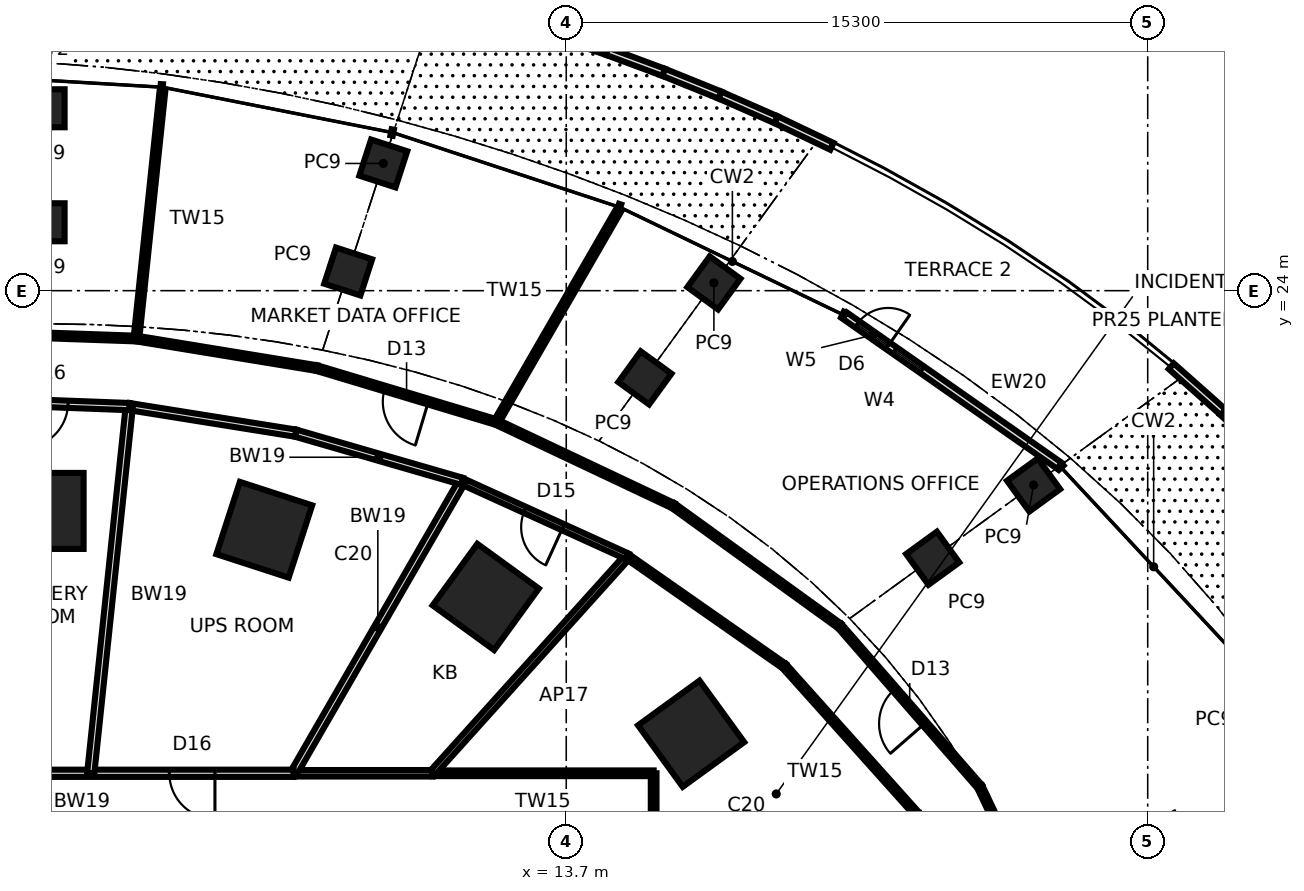
"""IFC4 building model, lengths in metres.
Left out: names, types, materials, properties, quantities, classifications, styles, units other than length and angle.
Written with IfcOpenShell. Run it as: python <this file> out.ifc"""

import sys

from ifc_helpers import new_model, si_unit, direction, frame, frame_2d, origin, origin_2d, place, context, subcontext, project, spatial, rectangle, extrude, element, fill, save


model = new_model("IFC4")
c1 = context("Model", 3, precision=1e-05, world=origin(), true_north=direction((0.0, 1.0)))
c2 = subcontext(c1, "Body", "Model", "MODEL_VIEW")
j1 = project(units=[si_unit("LENGTHUNIT", "METRE"), si_unit("PLANEANGLEUNIT", "RADIAN")], contexts=[c1])
p1 = place(None, origin())
s1 = spatial("IfcSite", under=j1, at=p1, CompositionType="ELEMENT")
p2 = place(p1, origin())
s2 = spatial("IfcBuilding", under=s1, at=p2, CompositionType="ELEMENT")
p3 = place(p2, frame((0.0, 0.0, 10.6)))
s3 = spatial("IfcBuildingStorey", under=s2, at=p3, CompositionType="ELEMENT", Elevation=10.6)
for number, where, z_axis, x_axis in (
    (1, (16.986, 12.341, 0.0), (0.0, 0.0, 1.0), (0.809, 0.588, 0.0)),
    (2, (11.581, 15.94, 0.0), (0.0, 0.0, 1.0), (0.588, 0.809, 0.0)),
    (3, (5.754, 17.708, 0.0), (0.0, 0.0, 1.0), (0.309, 0.951, 0.0)),
    (4, (0.0, 18.204, 0.0), (0.0, 0.0, 1.0), (0.0, 1.0, 0.0)),
):
    element("IfcColumn", number, at=place(p3, frame(where, z_axis=z_axis, x_axis=x_axis)), inside=s3, PredefinedType="COLUMN", context=c2, shape_type="SweptSolid", body=[
        extrude(rectangle(XDim=2.0, YDim=2.0, at=origin_2d()), origin(), (0.0, 0.0, 1.0), 4.5),
    ])
for number, where, z_axis, x_axis in (
    (5, (25.997, 18.888, 0.0), (0.0, 0.0, 1.0), (0.809, 0.588, 0.0)),
    (6, (17.585, 24.204, 0.0), (0.0, 0.0, 1.0), (0.588, 0.809, 0.0)),
    (7, (8.886, 27.347, 0.0), (0.0, 0.0, 1.0), (0.309, 0.951, 0.0)),
    (8, (0.0, 28.8, 0.0), (0.0, 0.0, 1.0), (0.0, 1.0, 0.0)),
    (9, (23.342, 16.959, 0.0), (0.0, 0.0, 1.0), (0.809, 0.588, 0.0)),
    (10, (15.77, 21.705, 0.0), (0.0, 0.0, 1.0), (0.588, 0.809, 0.0)),
    (11, (7.962, 24.504, 0.0), (0.0, 0.0, 1.0), (0.309, 0.951, 0.0)),
    (12, (0.0, 25.8, 0.0), (0.0, 0.0, 1.0), (0.0, 1.0, 0.0)),
):
    element("IfcColumn", number, at=place(p3, frame(where, z_axis=z_axis, x_axis=x_axis)), inside=s3, PredefinedType="COLUMN", context=c2, shape_type="SweptSolid", body=[
        extrude(rectangle(XDim=1.0, YDim=1.0, at=origin_2d()), origin(), (0.0, 0.0, 1.0), 4.5),
    ])
p4 = place(p3, frame((26.684, 19.387, 0.0), z_axis=(0.0, 0.0, 1.0), x_axis=(-0.81941448175, 0.573201454202, 0.0)))
e13 = element("IfcWall", 13, at=p4, inside=s3, PredefinedType="SOLIDWALL", context=c2, shape_type="SweptSolid", body=[
    extrude(rectangle(XDim=6.909, YDim=0.2, at=frame_2d((3.455, 0.0))), origin(), (0.0, 0.0, 1.0), 4.3),
])
p5 = place(p4, frame((5.51, 0.0, 0.0)))
e14 = element("IfcOpeningElement", 14, at=p5, cuts=e13, PredefinedType="OPENING", context=c2, shape_type="SweptSolid", body=[
    extrude(rectangle(XDim=1.0, YDim=2.4, at=frame_2d((0.5, 1.2))), frame((0.0, 0.11, 0.0), z_axis=(0.0, -1.0, 0.0), x_axis=(1.0, 0.0, 0.0)), (0.0, 0.0, 1.0), 0.22),
])
p6 = place(p4, frame((4.409, 0.0, 0.3)))
e15 = element("IfcOpeningElement", 15, at=p6, cuts=e13, PredefinedType="OPENING", context=c2, shape_type="SweptSolid", body=[
    extrude(rectangle(XDim=0.9, YDim=2.1, at=frame_2d((0.45, 1.05))), frame((0.0, 0.11, 0.0), z_axis=(0.0, -1.0, 0.0), x_axis=(1.0, 0.0, 0.0)), (0.0, 0.0, 1.0), 0.22),
])
p7 = place(p4, frame((5.51, 0.0, 2.7)))
e16 = element("IfcOpeningElement", 16, at=p7, cuts=e13, PredefinedType="OPENING", context=c2, shape_type="SweptSolid", body=[
    extrude(rectangle(XDim=1.0, YDim=0.6, at=frame_2d((0.5, 0.3))), frame((0.0, 0.11, 0.0), z_axis=(0.0, -1.0, 0.0), x_axis=(1.0, 0.0, 0.0)), (0.0, 0.0, 1.0), 0.22),
])
p8 = place(p3, frame((32.301, 19.511, 0.0), z_axis=(0.0, 0.0, 1.0), x_axis=(-0.714091012731, 0.700052873386, 0.0)))
e17 = element("IfcWall", 17, at=p8, inside=s3, PredefinedType="PARAPET", context=c2, shape_type="SweptSolid", body=[
    extrude(rectangle(XDim=1.844, YDim=0.2, at=frame_2d((0.922, 0.0))), origin(), (0.0, 0.0, 1.0), 1.1),
])
p9 = place(p3, frame((30.985, 20.802, 0.0), z_axis=(0.0, 0.0, 1.0), x_axis=(-0.748198942799, 0.66347444713, 0.0)))
e18 = element("IfcWall", 18, at=p9, inside=s3, PredefinedType="PARAPET", context=c2, shape_type="SweptSolid", body=[
    extrude(rectangle(XDim=1.824, YDim=0.2, at=frame_2d((0.912, 0.0))), origin(), (0.0, 0.0, 1.0), 1.1),
])
p10 = place(p3, frame((20.69, 27.798, 0.0), z_axis=(0.0, 0.0, 1.0), x_axis=(-0.902860518824, 0.429933580392, 0.0)))
e19 = element("IfcWall", 19, at=p10, inside=s3, PredefinedType="PARAPET", context=c2, shape_type="SweptSolid", body=[
    extrude(rectangle(XDim=1.63, YDim=0.2, at=frame_2d((0.815, 0.0))), origin(), (0.0, 0.0, 1.0), 1.1),
])
p11 = place(p3, frame((19.219, 28.499, 0.0), z_axis=(0.0, 0.0, 1.0), x_axis=(-0.915569278609, 0.402160286537, 0.0)))
e20 = element("IfcWall", 20, at=p11, inside=s3, PredefinedType="PARAPET", context=c2, shape_type="SweptSolid", body=[
    extrude(rectangle(XDim=1.613, YDim=0.2, at=frame_2d((0.807, 0.0))), origin(), (0.0, 0.0, 1.0), 1.1),
])
p12 = place(p3, frame((17.742, 29.148, 0.0), z_axis=(0.0, 0.0, 1.0), x_axis=(-0.9270897295, 0.374839476918, 0.0)))
e21 = element("IfcWall", 21, at=p12, inside=s3, PredefinedType="PARAPET", context=c2, shape_type="SweptSolid", body=[
    extrude(rectangle(XDim=1.598, YDim=0.2, at=frame_2d((0.799, 0.0))), origin(), (0.0, 0.0, 1.0), 1.1),
])
p13 = place(p3, frame((16.261, 29.747, 0.0), z_axis=(0.0, 0.0, 1.0), x_axis=(-0.93734477398, 0.348403178361, 0.0)))
e22 = element("IfcWall", 22, at=p13, inside=s3, PredefinedType="PARAPET", context=c2, shape_type="SweptSolid", body=[
    extrude(rectangle(XDim=1.584, YDim=0.2, at=frame_2d((0.792, 0.0))), origin(), (0.0, 0.0, 1.0), 1.1),
])
p14 = place(p3, frame((14.776, 30.299, 0.0), z_axis=(0.0, 0.0, 1.0), x_axis=(-0.946756658341, 0.321950042532, 0.0)))
e23 = element("IfcWall", 23, at=p14, inside=s3, PredefinedType="PARAPET", context=c2, shape_type="SweptSolid", body=[
    extrude(rectangle(XDim=1.573, YDim=0.2, at=frame_2d((0.786, 0.0))), origin(), (0.0, 0.0, 1.0), 1.1),
])
p15 = place(p3, frame((26.666, 6.552, 0.0), z_axis=(0.0, 0.0, 1.0), x_axis=(-0.428597870995, 0.903495359688, 0.0)))
e24 = element("IfcWall", 24, at=p15, inside=s3, PredefinedType="PARTITIONING", context=c2, shape_type="SweptSolid", body=[
    extrude(rectangle(XDim=4.862, YDim=0.15, at=frame_2d((2.431, 0.0))), origin(), (0.0, 0.0, 1.0), 4.3),
])
p16 = place(p3, frame((16.0, 4.321, 0.0), z_axis=(0.0, 0.0, 1.0), x_axis=(0.0, 1.0, 0.0)))
e25 = element("IfcWall", 25, at=p16, inside=s3, PredefinedType="PARTITIONING", context=c2, shape_type="SweptSolid", body=[
    extrude(rectangle(XDim=6.979, YDim=0.15, at=frame_2d((3.49, 0.0))), origin(), (0.0, 0.0, 1.0), 4.3),
])
p17 = place(p16, frame((2.915, 0.0, 0.0)))
e26 = element("IfcOpeningElement", 26, at=p17, cuts=e25, PredefinedType="OPENING", context=c2, shape_type="SweptSolid", body=[
    extrude(rectangle(XDim=1.2, YDim=2.4, at=frame_2d((0.6, 1.2))), frame((0.0, 0.085, 0.0), z_axis=(0.0, -1.0, 0.0), x_axis=(1.0, 0.0, 0.0)), (0.0, 0.0, 1.0), 0.17),
])
p18 = place(p3, frame((19.436, 14.121, 0.0), z_axis=(0.0, 0.0, 1.0), x_axis=(0.667266603128, -0.744818958103, 0.0)))
e27 = element("IfcWall", 27, at=p18, inside=s3, PredefinedType="PARTITIONING", context=c2, shape_type="SweptSolid", body=[
    extrude(rectangle(XDim=5.248, YDim=0.15, at=frame_2d((2.624, 0.0))), origin(), (0.0, 0.0, 1.0), 4.3),
])
p19 = place(p3, frame((24.582, 10.945, 0.0), z_axis=(0.0, 0.0, 1.0), x_axis=(-0.656952161656, 0.753932263069, 0.0)))
e28 = element("IfcWall", 28, at=p19, inside=s3, PredefinedType="PARTITIONING", context=c2, shape_type="SweptSolid", body=[
    extrude(rectangle(XDim=5.616, YDim=0.15, at=frame_2d((2.808, 0.0))), origin(), (0.0, 0.0, 1.0), 4.3),
])
p20 = place(p19, frame((2.208, 0.0, 0.0)))
e29 = element("IfcOpeningElement", 29, at=p20, cuts=e28, PredefinedType="OPENING", context=c2, shape_type="SweptSolid", body=[
    extrude(rectangle(XDim=1.2, YDim=2.4, at=frame_2d((0.6, 1.2))), frame((0.0, 0.085, 0.0), z_axis=(0.0, -1.0, 0.0), x_axis=(1.0, 0.0, 0.0)), (0.0, 0.0, 1.0), 0.17),
])
p21 = place(p3, frame((16.0, 11.3, 0.0), z_axis=(0.0, 0.0, 1.0), x_axis=(-1.0, 0.0, 0.0)))
e30 = element("IfcWall", 30, at=p21, inside=s3, PredefinedType="PARTITIONING", context=c2, shape_type="SweptSolid", body=[
    extrude(rectangle(XDim=5.825, YDim=0.15, at=frame_2d((2.913, 0.0))), origin(), (0.0, 0.0, 1.0), 4.3),
])
p22 = place(p3, frame((15.311, 17.004, 0.0), z_axis=(0.0, 0.0, 1.0), x_axis=(0.819662413359, -0.572846862719, 0.0)))
e31 = element("IfcWall", 31, at=p22, inside=s3, PredefinedType="PARTITIONING", context=c2, shape_type="SweptSolid", body=[
    extrude(rectangle(XDim=5.033, YDim=0.15, at=frame_2d((2.517, 0.0))), origin(), (0.0, 0.0, 1.0), 4.3),
])
p23 = place(p3, frame((20.892, 15.179, 0.0), z_axis=(0.0, 0.0, 1.0), x_axis=(-0.810528990045, 0.585698519971, 0.0)))
e32 = element("IfcWall", 32, at=p23, inside=s3, PredefinedType="PARTITIONING", context=c2, shape_type="SweptSolid", body=[
    extrude(rectangle(XDim=5.4, YDim=0.15, at=frame_2d((2.7, 0.0))), origin(), (0.0, 0.0, 1.0), 4.3),
])
p24 = place(p3, frame((10.175, 11.3, 0.0), z_axis=(0.0, 0.0, 1.0), x_axis=(0.669129902119, 0.743145459577, 0.0)))
e33 = element("IfcWall", 33, at=p24, inside=s3, PredefinedType="PARTITIONING", context=c2, shape_type="SweptSolid", body=[
    extrude(rectangle(XDim=7.676, YDim=0.17, at=frame_2d((3.838, 0.0))), origin(), (0.0, 0.0, 1.0), 4.3),
])
p25 = place(p3, frame((10.175, 11.3, 0.0), z_axis=(0.0, 0.0, 1.0), x_axis=(-1.0, 0.0, 0.0)))
e34 = element("IfcWall", 34, at=p25, inside=s3, PredefinedType="PARTITIONING", context=c2, shape_type="SweptSolid", body=[
    extrude(rectangle(XDim=3.65, YDim=0.17, at=frame_2d((1.825, 0.0))), origin(), (0.0, 0.0, 1.0), 4.3),
])
p26 = place(p3, frame((10.96, 18.983, 0.0), z_axis=(0.0, 0.0, 1.0), x_axis=(0.91025098655, -0.414056930246, 0.0)))
e35 = element("IfcWall", 35, at=p26, inside=s3, PredefinedType="PARTITIONING", context=c2, shape_type="SweptSolid", body=[
    extrude(rectangle(XDim=4.78, YDim=0.17, at=frame_2d((2.39, 0.0))), origin(), (0.0, 0.0, 1.0), 4.3),
])
p27 = place(p26, frame((1.815, 0.0, 0.0)))
e36 = element("IfcOpeningElement", 36, at=p27, cuts=e35, PredefinedType="OPENING", context=c2, shape_type="SweptSolid", body=[
    extrude(rectangle(XDim=1.1, YDim=2.4, at=frame_2d((0.55, 1.2))), frame((0.0, 0.095, 0.0), z_axis=(0.0, -1.0, 0.0), x_axis=(1.0, 0.0, 0.0)), (0.0, 0.0, 1.0), 0.19),
])
p28 = place(p3, frame((16.515, 18.342, 0.0), z_axis=(0.0, 0.0, 1.0), x_axis=(-0.904108237681, 0.427303515732, 0.0)))
e37 = element("IfcWall", 37, at=p28, inside=s3, PredefinedType="PARTITIONING", context=c2, shape_type="SweptSolid", body=[
    extrude(rectangle(XDim=5.149, YDim=0.15, at=frame_2d((2.574, 0.0))), origin(), (0.0, 0.0, 1.0), 4.3),
])
p29 = place(p3, frame((6.524, 11.3, 0.0), z_axis=(0.0, 0.0, 1.0), x_axis=(0.499995604398, 0.866027941571, 0.0)))
e38 = element("IfcWall", 38, at=p29, inside=s3, PredefinedType="SOLIDWALL", context=c2, shape_type="SweptSolid", body=[
    extrude(rectangle(XDim=8.872, YDim=0.19, at=frame_2d((4.436, 0.0))), origin(), (0.0, 0.0, 1.0), 4.3),
])
p30 = place(p3, frame((11.86, 20.542, 0.0), z_axis=(0.0, 0.0, 1.0), x_axis=(0.500015529916, 0.866016437397, 0.0)))
e39 = element("IfcWall", 39, at=p30, inside=s3, PredefinedType="PARTITIONING", context=c2, shape_type="SweptSolid", body=[
    extrude(rectangle(XDim=6.442, YDim=0.15, at=frame_2d((3.221, 0.0))), origin(), (0.0, 0.0, 1.0), 4.3),
])
p31 = place(p3, frame((6.58, 20.25, 0.0), z_axis=(0.0, 0.0, 1.0), x_axis=(0.960617684211, -0.277873469014, 0.0)))
e40 = element("IfcWall", 40, at=p31, inside=s3, PredefinedType="SOLIDWALL", context=c2, shape_type="SweptSolid", body=[
    extrude(rectangle(XDim=4.56, YDim=0.19, at=frame_2d((2.28, 0.0))), origin(), (0.0, 0.0, 1.0), 4.3),
])
p32 = place(p3, frame((11.86, 20.542, 0.0), z_axis=(0.0, 0.0, 1.0), x_axis=(-0.957658569451, 0.287906346504, 0.0)))
e41 = element("IfcWall", 41, at=p32, inside=s3, PredefinedType="PARTITIONING", context=c2, shape_type="SweptSolid", body=[
    extrude(rectangle(XDim=4.933, YDim=0.15, at=frame_2d((2.466, 0.0))), origin(), (0.0, 0.0, 1.0), 4.3),
])
p33 = place(p32, frame((1.866, 0.0, 0.0)))
e42 = element("IfcOpeningElement", 42, at=p33, cuts=e41, PredefinedType="OPENING", context=c2, shape_type="SweptSolid", body=[
    extrude(rectangle(XDim=1.2, YDim=2.4, at=frame_2d((0.6, 1.2))), frame((0.0, 0.085, 0.0), z_axis=(0.0, -1.0, 0.0), x_axis=(1.0, 0.0, 0.0)), (0.0, 0.0, 1.0), 0.17),
])
p34 = place(p3, frame((6.524, 11.3, 0.0), z_axis=(0.0, 0.0, 1.0), x_axis=(-1.0, 0.0, 0.0)))
e43 = element("IfcWall", 43, at=p34, inside=s3, PredefinedType="SOLIDWALL", context=c2, shape_type="SweptSolid", body=[
    extrude(rectangle(XDim=7.712, YDim=0.19, at=frame_2d((3.856, 0.0))), origin(), (0.0, 0.0, 1.0), 4.3),
])
p35 = place(p34, frame((2.068, 0.0, 0.0)))
e44 = element("IfcOpeningElement", 44, at=p35, cuts=e43, PredefinedType="OPENING", context=c2, shape_type="SweptSolid", body=[
    extrude(rectangle(XDim=1.2, YDim=2.1, at=frame_2d((0.6, 1.05))), frame((0.0, 0.105, 0.0), z_axis=(0.0, -1.0, 0.0), x_axis=(1.0, 0.0, 0.0)), (0.0, 0.0, 1.0), 0.21),
])
p36 = place(p3, frame((2.202, 20.95, 0.0), z_axis=(0.0, 0.0, 1.0), x_axis=(0.987474630924, -0.157777860554, 0.0)))
e45 = element("IfcWall", 45, at=p36, inside=s3, PredefinedType="SOLIDWALL", context=c2, shape_type="SweptSolid", body=[
    extrude(rectangle(XDim=4.433, YDim=0.19, at=frame_2d((2.217, 0.0))), origin(), (0.0, 0.0, 1.0), 4.3),
])
p37 = place(p3, frame((7.136, 21.962, 0.0), z_axis=(0.0, 0.0, 1.0), x_axis=(-0.986833510284, 0.161739367445, 0.0)))
e46 = element("IfcWall", 46, at=p37, inside=s3, PredefinedType="PARTITIONING", context=c2, shape_type="SweptSolid", body=[
    extrude(rectangle(XDim=4.809, YDim=0.15, at=frame_2d((2.405, 0.0))), origin(), (0.0, 0.0, 1.0), 4.3),
])
p38 = place(p3, frame((1.188, 11.3, 0.0), z_axis=(0.0, 0.0, 1.0), x_axis=(0.104522368483, 0.994522535937, 0.0)))
e47 = element("IfcWall", 47, at=p38, inside=s3, PredefinedType="SOLIDWALL", context=c2, shape_type="SweptSolid", body=[
    extrude(rectangle(XDim=9.703, YDim=0.19, at=frame_2d((4.852, 0.0))), origin(), (0.0, 0.0, 1.0), 4.3),
])
p39 = place(p3, frame((2.39, 22.74, 0.0), z_axis=(0.0, 0.0, 1.0), x_axis=(0.104506800139, 0.994524172016, 0.0)))
e48 = element("IfcWall", 48, at=p39, inside=s3, PredefinedType="PARTITIONING", context=c2, shape_type="SweptSolid", body=[
    extrude(rectangle(XDim=6.569, YDim=0.15, at=frame_2d((3.285, 0.0))), origin(), (0.0, 0.0, 1.0), 4.3),
])
p40 = place(p3, frame((2.39, 22.74, 0.0), z_axis=(0.0, 0.0, 1.0), x_axis=(-0.999401824383, 0.034583137783, 0.0)))
e49 = element("IfcWall", 49, at=p40, inside=s3, PredefinedType="PARTITIONING", context=c2, shape_type="SweptSolid", body=[
    extrude(rectangle(XDim=4.801, YDim=0.15, at=frame_2d((2.4, 0.0))), origin(), (0.0, 0.0, 1.0), 4.3),
])
p41 = place(p3, frame((-2.219, 21.116, 0.0), z_axis=(0.0, 0.0, 1.0), x_axis=(0.999293736035, -0.037576975938, 0.0)))
e50 = element("IfcWall", 50, at=p41, inside=s3, PredefinedType="SOLIDWALL", context=c2, shape_type="SweptSolid", body=[
    extrude(rectangle(XDim=4.425, YDim=0.19, at=frame_2d((2.212, 0.0))), origin(), (0.0, 0.0, 1.0), 4.3),
])
p42 = place(p41, frame((1.612, 0.0, 0.0)))
e51 = element("IfcOpeningElement", 51, at=p42, cuts=e50, PredefinedType="OPENING", context=c2, shape_type="SweptSolid", body=[
    extrude(rectangle(XDim=1.2, YDim=2.1, at=frame_2d((0.6, 1.05))), frame((0.0, 0.105, 0.0), z_axis=(0.0, -1.0, 0.0), x_axis=(1.0, 0.0, 0.0)), (0.0, 0.0, 1.0), 0.21),
])
p43 = place(p5, frame((1.0, 0.0, 0.0), z_axis=(0.0, 0.0, 1.0), x_axis=(-1.0, 0.0, 0.0)))
e52 = element("IfcDoor", 52, at=p43, inside=s3, OperationType="SINGLE_SWING_RIGHT", PredefinedType="DOOR", context=c2, shape_type="SweptSolid", body=[
    extrude(rectangle(XDim=1.0, YDim=2.4, at=frame_2d((0.5, 1.2))), frame((0.0, 0.025, 0.0), z_axis=(0.0, -1.0, 0.0), x_axis=(1.0, 0.0, 0.0)), (0.0, 0.0, 1.0), 0.05),
])
fill(e14, e52)
p44 = place(p6, origin())
e53 = element("IfcWindow", 53, at=p44, inside=s3, PartitioningType="SINGLE_PANEL", PredefinedType="WINDOW", context=c2, shape_type="SweptSolid", body=[
    extrude(rectangle(XDim=0.9, YDim=2.1, at=frame_2d((0.45, 1.05))), frame((0.0, 0.03, 0.0), z_axis=(0.0, -1.0, 0.0), x_axis=(1.0, 0.0, 0.0)), (0.0, 0.0, 1.0), 0.06),
])
fill(e15, e53)
p45 = place(p7, origin())
e54 = element("IfcWindow", 54, at=p45, inside=s3, PartitioningType="SINGLE_PANEL", PredefinedType="WINDOW", context=c2, shape_type="SweptSolid", body=[
    extrude(rectangle(XDim=1.0, YDim=0.6, at=frame_2d((0.5, 0.3))), frame((0.0, 0.03, 0.0), z_axis=(0.0, -1.0, 0.0), x_axis=(1.0, 0.0, 0.0)), (0.0, 0.0, 1.0), 0.06),
])
fill(e16, e54)
p46 = place(p27, frame((1.1, 0.0, 0.0), z_axis=(0.0, 0.0, 1.0), x_axis=(-1.0, 0.0, 0.0)))
e55 = element("IfcDoor", 55, at=p46, inside=s3, OperationType="SINGLE_SWING_LEFT", PredefinedType="DOOR", context=c2, shape_type="SweptSolid", body=[
    extrude(rectangle(XDim=1.1, YDim=2.4, at=frame_2d((0.55, 1.2))), frame((0.0, 0.025, 0.0), z_axis=(0.0, -1.0, 0.0), x_axis=(1.0, 0.0, 0.0)), (0.0, 0.0, 1.0), 0.05),
])
fill(e36, e55)
p47 = place(p35, origin())
e56 = element("IfcDoor", 56, at=p47, inside=s3, OperationType="SINGLE_SWING_LEFT", PredefinedType="DOOR", context=c2, shape_type="SweptSolid", body=[
    extrude(rectangle(XDim=1.2, YDim=2.1, at=frame_2d((0.6, 1.05))), frame((0.0, 0.025, 0.0), z_axis=(0.0, -1.0, 0.0), x_axis=(1.0, 0.0, 0.0)), (0.0, 0.0, 1.0), 0.05),
])
fill(e44, e56)
p48 = place(p42, frame((1.2, 0.0, 0.0), z_axis=(0.0, 0.0, 1.0), x_axis=(-1.0, 0.0, 0.0)))
e57 = element("IfcDoor", 57, at=p48, inside=s3, OperationType="SINGLE_SWING_RIGHT", PredefinedType="DOOR", context=c2, shape_type="SweptSolid", body=[
    extrude(rectangle(XDim=1.2, YDim=2.1, at=frame_2d((0.6, 1.05))), frame((0.0, 0.025, 0.0), z_axis=(0.0, -1.0, 0.0), x_axis=(1.0, 0.0, 0.0)), (0.0, 0.0, 1.0), 0.05),
])
fill(e51, e57)
p49 = place(p20, origin())
e58 = element("IfcDoor", 58, at=p49, inside=s3, OperationType="SINGLE_SWING_LEFT", PredefinedType="DOOR", context=c2, shape_type="SweptSolid", body=[
    extrude(rectangle(XDim=1.2, YDim=2.4, at=frame_2d((0.6, 1.2))), frame((0.0, 0.025, 0.0), z_axis=(0.0, -1.0, 0.0), x_axis=(1.0, 0.0, 0.0)), (0.0, 0.0, 1.0), 0.05),
])
fill(e29, e58)
p50 = place(p33, origin())
e59 = element("IfcDoor", 59, at=p50, inside=s3, OperationType="SINGLE_SWING_LEFT", PredefinedType="DOOR", context=c2, shape_type="SweptSolid", body=[
    extrude(rectangle(XDim=1.2, YDim=2.4, at=frame_2d((0.6, 1.2))), frame((0.0, 0.025, 0.0), z_axis=(0.0, -1.0, 0.0), x_axis=(1.0, 0.0, 0.0)), (0.0, 0.0, 1.0), 0.05),
])
fill(e42, e59)
save(model, sys.argv[1])
